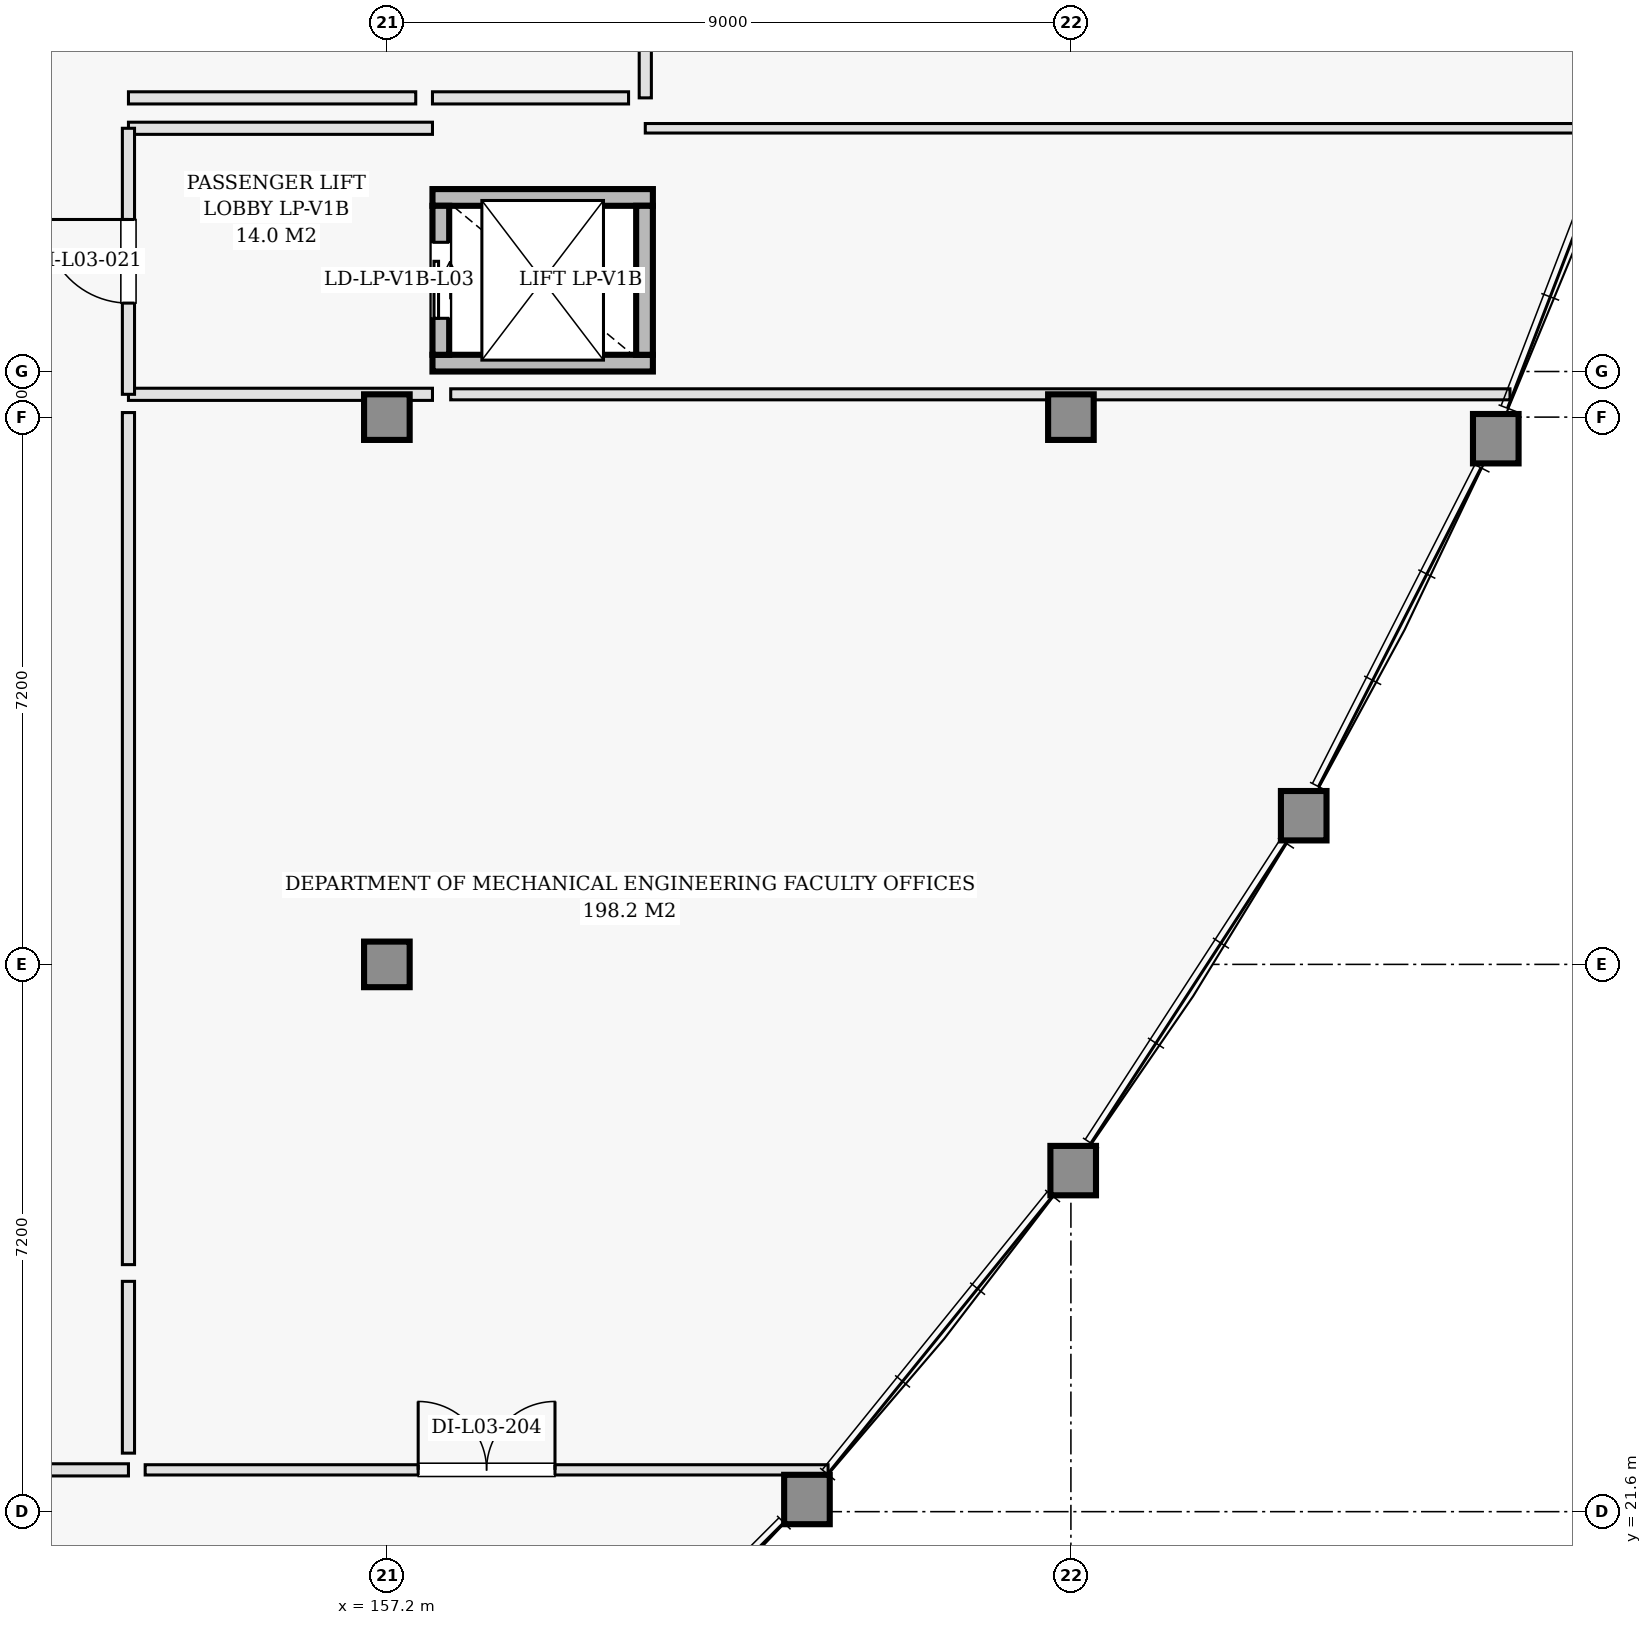
"""IFC4 building model, lengths in metres.
Left out: names, types, materials, properties, quantities, classifications, styles, units other than length and angle.
Written with IfcOpenShell. Run it as: python <this file> out.ifc"""

import sys

from ifc_helpers import new_model, si_unit, direction, frame, frame_2d, origin, origin_2d, place, context, subcontext, project, spatial, rectangle, extrude, element, fill, save


model = new_model("IFC4")
c1 = context("Model", 3, precision=1e-05, world=origin(), true_north=direction((0.0, 1.0)))
c2 = subcontext(c1, "Body", "Model", "MODEL_VIEW")
j1 = project(units=[si_unit("LENGTHUNIT", "METRE"), si_unit("PLANEANGLEUNIT", "RADIAN")], contexts=[c1])
p1 = place(None, origin())
s1 = spatial("IfcSite", under=j1, at=p1, CompositionType="ELEMENT")
p2 = place(p1, origin())
s2 = spatial("IfcBuilding", under=s1, at=p2, CompositionType="ELEMENT")
p3 = place(p2, frame((0.0, 0.0, 13.8)))
s3 = spatial("IfcBuildingStorey", under=s2, at=p3, CompositionType="ELEMENT", Elevation=13.8)
for number, where, z_axis, x_axis in (
    (1, (157.2, 28.8, 0.0), (0.0, 0.0, 1.0), (1.0, 0.0, 0.0)),
    (2, (157.2, 36.0, 0.0), (0.0, 0.0, 1.0), (1.0, 0.0, 0.0)),
    (3, (166.2, 36.0, 0.0), (0.0, 0.0, 1.0), (1.0, 0.0, 0.0)),
):
    element("IfcColumn", number, at=place(p3, frame(where, z_axis=z_axis, x_axis=x_axis)), inside=s3, PredefinedType="COLUMN", context=c2, shape_type="SweptSolid", body=[
        extrude(rectangle(XDim=0.6, YDim=0.6, at=origin_2d()), origin(), (0.0, 0.0, 1.0), 4.2),
    ])
p4 = place(p3, frame((162.727, 21.76, 0.0), z_axis=(0.202314255248, -0.182121983712, 0.96223724994), x_axis=(0.669044195359, 0.743222621196, 0.0)))
e4 = element("IfcColumn", 4, at=p4, inside=s3, PredefinedType="USERDEFINED", context=c2, shape_type="SweptSolid", body=[
    extrude(rectangle(XDim=0.45, YDim=0.65, at=origin_2d()), origin(), (0.0, 0.0, 1.0), 4.365),
])
p5 = place(p3, frame((166.23, 26.087, 0.0), z_axis=(0.220368565048, -0.160130761861, 0.962182848862), x_axis=(0.587842020892, 0.80897574653, 0.0)))
e5 = element("IfcColumn", 5, at=p5, inside=s3, PredefinedType="USERDEFINED", context=c2, shape_type="SweptSolid", body=[
    extrude(rectangle(XDim=0.45, YDim=0.65, at=origin_2d()), origin(), (0.0, 0.0, 1.0), 4.365),
])
p6 = place(p3, frame((169.263, 30.756, 0.0), z_axis=(0.235762399662, -0.136087762367, 0.962235008633), x_axis=(0.499918108492, 0.866072678707, 0.0)))
e6 = element("IfcColumn", 6, at=p6, inside=s3, PredefinedType="USERDEFINED", context=c2, shape_type="SweptSolid", body=[
    extrude(rectangle(XDim=0.45, YDim=0.65, at=origin_2d()), origin(), (0.0, 0.0, 1.0), 4.365),
])
p7 = place(p3, frame((171.79, 35.716, 0.0), z_axis=(0.248789048829, -0.110690990925, 0.962211782151), x_axis=(0.406500543495, 0.913650539396, 0.0)))
e7 = element("IfcColumn", 7, at=p7, inside=s3, PredefinedType="USERDEFINED", context=c2, shape_type="SweptSolid", body=[
    extrude(rectangle(XDim=0.45, YDim=0.65, at=origin_2d()), origin(), (0.0, 0.0, 1.0), 4.365),
])
for number, where, z_axis, x_axis in (
    (8, (157.8, 36.71, 0.0), (0.0, 0.0, 1.0), (1.0, 0.0, 0.0)),
    (9, (157.8, 38.89, 0.0), (0.0, 0.0, 1.0), (1.0, 0.0, 0.0)),
):
    element("IfcWall", number, at=place(p3, frame(where, z_axis=z_axis, x_axis=x_axis)), inside=s3, PredefinedType="SHEAR", context=c2, shape_type="SweptSolid", body=[
        extrude(rectangle(XDim=2.9, YDim=0.22, at=frame_2d((1.45, 0.0))), origin(), (0.0, 0.0, 1.0), 3.96),
    ])
p8 = place(p3, frame((157.91, 36.82, 0.0), z_axis=(0.0, 0.0, 1.0), x_axis=(0.0, 1.0, 0.0)))
e10 = element("IfcWall", 10, at=p8, inside=s3, PredefinedType="SHEAR", context=c2, shape_type="SweptSolid", body=[
    extrude(rectangle(XDim=1.96, YDim=0.22, at=frame_2d((0.98, 0.0))), origin(), (0.0, 0.0, 1.0), 3.96),
])
p9 = place(p8, frame((0.48, 0.0, 0.0)))
e11 = element("IfcOpeningElement", 11, at=p9, cuts=e10, PredefinedType="OPENING", context=c2, shape_type="SweptSolid", body=[
    extrude(rectangle(XDim=1.0, YDim=2.15, at=frame_2d((0.5, 1.075))), frame((0.0, 0.12, 0.0), z_axis=(0.0, -1.0, 0.0), x_axis=(1.0, 0.0, 0.0)), (0.0, 0.0, 1.0), 0.24),
])
p10 = place(p3, frame((160.59, 36.82, 0.0), z_axis=(0.0, 0.0, 1.0), x_axis=(0.0, 1.0, 0.0)))
e12 = element("IfcWall", 12, at=p10, inside=s3, PredefinedType="SHEAR", context=c2, shape_type="SweptSolid", body=[
    extrude(rectangle(XDim=1.96, YDim=0.22, at=frame_2d((0.98, 0.0))), origin(), (0.0, 0.0, 1.0), 3.96),
])
p11 = place(p3, frame((153.8, 36.3, 0.0), z_axis=(0.0, 0.0, 1.0), x_axis=(1.0, 0.0, 0.0)))
e13 = element("IfcWall", 13, at=p11, inside=s3, PredefinedType="PARTITIONING", context=c2, shape_type="SweptSolid", body=[
    extrude(rectangle(XDim=4.0, YDim=0.16, at=frame_2d((2.0, 0.0))), origin(), (0.0, 0.0, 1.0), 3.145),
])
p12 = place(p3, frame((153.8, 39.8, 0.0), z_axis=(0.0, 0.0, 1.0), x_axis=(1.0, 0.0, 0.0)))
e14 = element("IfcWall", 14, at=p12, inside=s3, PredefinedType="PARTITIONING", context=c2, shape_type="SweptSolid", body=[
    extrude(rectangle(XDim=4.0, YDim=0.16, at=frame_2d((2.0, 0.0))), origin(), (0.0, 0.0, 1.0), 3.295),
])
p13 = place(p3, frame((153.8, 36.3, 0.0), z_axis=(0.0, 0.0, 1.0), x_axis=(0.0, 1.0, 0.0)))
e15 = element("IfcWall", 15, at=p13, inside=s3, PredefinedType="PARTITIONING", context=c2, shape_type="SweptSolid", body=[
    extrude(rectangle(XDim=3.5, YDim=0.16, at=frame_2d((1.75, 0.0))), origin(), (0.0, 0.0, 1.0), 3.505),
])
p14 = place(p13, frame((1.2, 0.0, 0.0)))
e16 = element("IfcOpeningElement", 16, at=p14, cuts=e15, PredefinedType="OPENING", context=c2, shape_type="SweptSolid", body=[
    extrude(rectangle(XDim=1.1, YDim=2.15, at=frame_2d((0.55, 1.075))), frame((0.0, 0.09, 0.0), z_axis=(0.0, -1.0, 0.0), x_axis=(1.0, 0.0, 0.0)), (0.0, 0.0, 1.0), 0.18),
])
p15 = place(p3, frame((160.6, 40.2, 0.0), z_axis=(0.0, 0.0, 1.0), x_axis=(0.0, 1.0, 0.0)))
e17 = element("IfcWall", 17, at=p15, inside=s3, PredefinedType="PARTITIONING", context=c2, shape_type="SweptSolid", body=[
    extrude(rectangle(XDim=2.8, YDim=0.16, at=frame_2d((1.4, 0.0))), origin(), (0.0, 0.0, 1.0), 3.505),
])
p16 = place(p15, frame((0.85, 0.0, 0.0)))
e18 = element("IfcOpeningElement", 18, at=p16, cuts=e17, PredefinedType="OPENING", context=c2, shape_type="SweptSolid", body=[
    extrude(rectangle(XDim=1.1, YDim=2.15, at=frame_2d((0.55, 1.075))), frame((0.0, 0.09, 0.0), z_axis=(0.0, -1.0, 0.0), x_axis=(1.0, 0.0, 0.0)), (0.0, 0.0, 1.0), 0.18),
])
p17 = place(p3, frame((160.6, 39.8, 0.0), z_axis=(0.0, 0.0, 1.0), x_axis=(1.0, 0.0, 0.0)))
e19 = element("IfcWall", 19, at=p17, inside=s3, PredefinedType="PARTITIONING", context=c2, shape_type="SweptSolid", body=[
    extrude(rectangle(XDim=12.736, YDim=0.125, at=frame_2d((6.368, 0.0))), origin(), (0.0, 0.0, 1.0), 3.295),
])
p18 = place(p3, frame((148.35, 22.15, 0.0), z_axis=(0.0, 0.0, 1.0), x_axis=(1.0, 0.0, 0.0)))
e20 = element("IfcWall", 20, at=p18, inside=s3, PredefinedType="PARTITIONING", context=c2, shape_type="SweptSolid", body=[
    extrude(rectangle(XDim=5.45, YDim=0.16, at=frame_2d((2.725, 0.0))), origin(), (0.0, 0.0, 1.0), 3.295),
])
p19 = place(p18, frame((1.925, 0.0, 0.0)))
e21 = element("IfcOpeningElement", 21, at=p19, cuts=e20, PredefinedType="OPENING", context=c2, shape_type="SweptSolid", body=[
    extrude(rectangle(XDim=1.6, YDim=2.2, at=frame_2d((0.8, 1.1))), frame((0.0, 0.09, 0.0), z_axis=(0.0, -1.0, 0.0), x_axis=(1.0, 0.0, 0.0)), (0.0, 0.0, 1.0), 0.18),
])
p20 = place(p3, frame((154.02, 22.15, 0.0), z_axis=(0.0, 0.0, 1.0), x_axis=(1.0, 0.0, 0.0)))
e22 = element("IfcWall", 22, at=p20, inside=s3, PredefinedType="PARTITIONING", context=c2, shape_type="SweptSolid", body=[
    extrude(rectangle(XDim=8.985, YDim=0.135, at=frame_2d((4.492, 0.0))), origin(), (0.0, 0.0, 1.0), 3.445),
])
p21 = place(p20, frame((3.592, 0.0, 0.0)))
e23 = element("IfcOpeningElement", 23, at=p21, cuts=e22, PredefinedType="OPENING", context=c2, shape_type="SweptSolid", body=[
    extrude(rectangle(XDim=1.8, YDim=2.2, at=frame_2d((0.9, 1.1))), frame((0.0, 0.078, 0.0), z_axis=(0.0, -1.0, 0.0), x_axis=(1.0, 0.0, 0.0)), (0.0, 0.0, 1.0), 0.155),
])
p22 = place(p3, frame((153.8, 24.85, 0.0), z_axis=(0.0, 0.0, 1.0), x_axis=(0.0, 1.0, 0.0)))
e24 = element("IfcWall", 24, at=p22, inside=s3, PredefinedType="PARTITIONING", context=c2, shape_type="SweptSolid", body=[
    extrude(rectangle(XDim=11.21, YDim=0.16, at=frame_2d((5.605, 0.0))), origin(), (0.0, 0.0, 1.0), 3.145),
])
p23 = place(p3, frame((153.8, 22.37, 0.0), z_axis=(0.0, 0.0, 1.0), x_axis=(0.0, 1.0, 0.0)))
e25 = element("IfcWall", 25, at=p23, inside=s3, PredefinedType="PARTITIONING", context=c2, shape_type="SweptSolid", body=[
    extrude(rectangle(XDim=2.26, YDim=0.16, at=frame_2d((1.13, 0.0))), origin(), (0.0, 0.0, 1.0), 3.96),
])
p24 = place(p3, frame((158.04, 36.3, 0.0), z_axis=(0.0, 0.0, 1.0), x_axis=(1.0, 0.0, 0.0)))
e26 = element("IfcWall", 26, at=p24, inside=s3, PredefinedType="PARTITIONING", context=c2, shape_type="SweptSolid", body=[
    extrude(rectangle(XDim=13.937, YDim=0.145, at=frame_2d((6.969, 0.0))), origin(), (0.0, 0.0, 1.0), 3.145),
])
p25 = place(p3, frame((157.8, 40.2, 0.0), z_axis=(0.0, 0.0, 1.0), x_axis=(1.0, 0.0, 0.0)))
e27 = element("IfcWall", 27, at=p25, inside=s3, PredefinedType="PARTITIONING", context=c2, shape_type="SweptSolid", body=[
    extrude(rectangle(XDim=2.58, YDim=0.16, at=frame_2d((1.29, 0.0))), origin(), (0.0, 0.0, 1.0), 3.96),
])
p26 = place(p3, frame((153.8, 40.2, 0.0), z_axis=(0.0, 0.0, 1.0), x_axis=(1.0, 0.0, 0.0)))
e28 = element("IfcWall", 28, at=p26, inside=s3, PredefinedType="PARTITIONING", context=c2, shape_type="SweptSolid", body=[
    extrude(rectangle(XDim=3.78, YDim=0.16, at=frame_2d((1.89, 0.0))), origin(), (0.0, 0.0, 1.0), 3.295),
])
p27 = place(p9, origin())
e29 = element("IfcDoor", 29, at=p27, inside=s3, OperationType="SLIDING_TO_LEFT", PredefinedType="DOOR", context=c2, shape_type="SweptSolid", body=[
    extrude(rectangle(XDim=1.0, YDim=2.15, at=frame_2d((0.5, 1.075))), frame((0.0, 0.025, 0.0), z_axis=(0.0, -1.0, 0.0), x_axis=(1.0, 0.0, 0.0)), (0.0, 0.0, 1.0), 0.05),
])
fill(e11, e29)
p28 = place(p14, origin())
e30 = element("IfcDoor", 30, at=p28, inside=s3, OperationType="SINGLE_SWING_RIGHT", PredefinedType="DOOR", context=c2, shape_type="SweptSolid", body=[
    extrude(rectangle(XDim=1.1, YDim=2.15, at=frame_2d((0.55, 1.075))), frame((0.0, 0.025, 0.0), z_axis=(0.0, -1.0, 0.0), x_axis=(1.0, 0.0, 0.0)), (0.0, 0.0, 1.0), 0.05),
])
fill(e16, e30)
p29 = place(p21, origin())
e31 = element("IfcDoor", 31, at=p29, inside=s3, OperationType="DOUBLE_DOOR_SINGLE_SWING", PredefinedType="DOOR", context=c2, shape_type="SweptSolid", body=[
    extrude(rectangle(XDim=1.8, YDim=2.2, at=frame_2d((0.9, 1.1))), frame((0.0, 0.025, 0.0), z_axis=(0.0, -1.0, 0.0), x_axis=(1.0, 0.0, 0.0)), (0.0, 0.0, 1.0), 0.05),
])
fill(e23, e31)
save(model, sys.argv[1])
